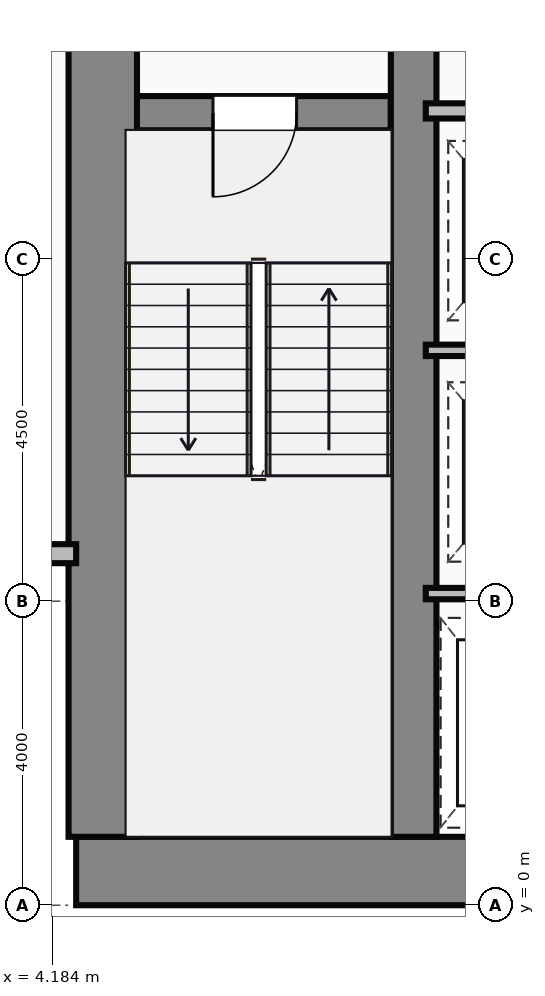
"""IFC4 building model, lengths in metres.
Left out: names, types, materials, properties, quantities, classifications, styles, units other than length and angle.
Written with IfcOpenShell. Run it as: python <this file> out.ifc"""

import sys

from ifc_helpers import new_model, si_unit, direction, frame, frame_2d, origin, place, context, subcontext, project, spatial, rectangle, extrude, source, transform, mapped, element, fill, save


model = new_model("IFC4")
c1 = context("Model", 3, precision=1e-05, world=origin(), true_north=direction((0.0, 1.0)))
c2 = subcontext(c1, "Body", "Model", "MODEL_VIEW")
j1 = project(units=[si_unit("LENGTHUNIT", "METRE"), si_unit("PLANEANGLEUNIT", "RADIAN")], contexts=[c1])
p1 = place(None, origin())
s1 = spatial("IfcSite", under=j1, at=p1, CompositionType="ELEMENT")
p2 = place(p1, origin())
s2 = spatial("IfcBuilding", under=s1, at=p2, CompositionType="ELEMENT")
p3 = place(p2, frame((0.0, 0.0, 72.65)))
s3 = spatial("IfcBuildingStorey", under=s2, at=p3, CompositionType="ELEMENT", Elevation=72.65)
m1 = source(origin(), c2, "Body", "SweptSolid", [
    extrude(rectangle(XDim=29.5, YDim=0.9, at=frame_2d((14.75, 0.0))), origin(), (0.0, 0.0, 1.0), 3.65),
])
p4 = place(p3, frame((4.5, 0.45, 0.0), z_axis=(0.0, 0.0, 1.0), x_axis=(1.0, 0.0, 0.0)))
e1 = element("IfcWall", 1, at=p4, inside=s3, PredefinedType="SHEAR", context=c2, shape_type="MappedRepresentation", body=[
    mapped(m1, transform((0.0, 0.0, 0.0))),
])
m2 = source(origin(), c2, "Body", "SweptSolid", [
    extrude(rectangle(XDim=13.1, YDim=0.9, at=frame_2d((6.55, 0.0))), origin(), (0.0, 0.0, 1.0), 3.65),
])
p5 = place(p3, frame((4.85, 0.9, 0.0), z_axis=(0.0, 0.0, 1.0), x_axis=(0.0, 1.0, 0.0)))
e2 = element("IfcWall", 2, at=p5, inside=s3, PredefinedType="SHEAR", context=c2, shape_type="MappedRepresentation", body=[
    mapped(m2, transform((0.0, 0.0, 0.0))),
])
m3 = source(origin(), c2, "Body", "SweptSolid", [
    extrude(rectangle(XDim=12.2, YDim=0.6, at=frame_2d((6.1, 0.0))), origin(), (0.0, 0.0, 1.0), 3.65),
])
p6 = place(p3, frame((8.94, 0.9, 0.0), z_axis=(0.0, 0.0, 1.0), x_axis=(0.0, 1.0, 0.0)))
e3 = element("IfcWall", 3, at=p6, inside=s3, PredefinedType="SHEAR", context=c2, shape_type="MappedRepresentation", body=[
    mapped(m3, transform((0.0, 0.0, 0.0))),
])
m4 = source(origin(), c2, "Body", "SweptSolid", [
    extrude(rectangle(XDim=3.39, YDim=0.45, at=frame_2d((1.695, 0.0))), origin(), (0.0, 0.0, 1.0), 3.65),
])
p7 = place(p3, frame((5.25, 10.42, 0.0), z_axis=(0.0, 0.0, 1.0), x_axis=(1.0, 0.0, 0.0)))
e4 = element("IfcWall", 4, at=p7, inside=s3, PredefinedType="SHEAR", context=c2, shape_type="MappedRepresentation", body=[
    mapped(m4, transform((0.0, 0.0, 0.0))),
])
p8 = place(p7, frame((1.05, 0.0, 0.0)))
e5 = element("IfcOpeningElement", 5, at=p8, cuts=e4, PredefinedType="OPENING", context=c2, shape_type="SweptSolid", body=[
    extrude(rectangle(XDim=1.1, YDim=2.15, at=frame_2d((0.55, 1.075))), frame((0.0, 0.235, 0.0), z_axis=(0.0, -1.0, 0.0), x_axis=(1.0, 0.0, 0.0)), (0.0, 0.0, 1.0), 0.47),
])
m5 = source(origin(), c2, "Body", "SweptSolid", [
    extrude(rectangle(XDim=4.5, YDim=0.25, at=frame_2d((2.25, 0.0))), origin(), (0.0, 0.0, 1.0), 3.4),
])
p9 = place(p3, frame((0.0, 4.625, 0.0), z_axis=(0.0, 0.0, 1.0), x_axis=(1.0, 0.0, 0.0)))
e6 = element("IfcWall", 6, at=p9, inside=s3, PredefinedType="STANDARD", context=c2, shape_type="MappedRepresentation", body=[
    mapped(m5, transform((0.0, 0.0, 0.0))),
])
m6 = source(origin(), c2, "Body", "SweptSolid", [
    extrude(rectangle(XDim=2.35, YDim=0.2, at=frame_2d((1.175, 0.0))), origin(), (0.0, 0.0, 1.0), 3.4),
])
p10 = place(p3, frame((9.1, 10.45, 0.0), z_axis=(0.0, 0.0, 1.0), x_axis=(1.0, 0.0, 0.0)))
e7 = element("IfcWall", 7, at=p10, inside=s3, PredefinedType="PARTITIONING", context=c2, shape_type="MappedRepresentation", body=[
    mapped(m6, transform((0.0, 0.0, 0.0))),
])
p11 = place(p10, frame((0.55, 0.0, 0.0)))
e8 = element("IfcOpeningElement", 8, at=p11, cuts=e7, PredefinedType="OPENING", context=c2, shape_type="SweptSolid", body=[
    extrude(rectangle(XDim=1.1, YDim=2.15, at=frame_2d((0.55, 1.075))), frame((0.0, 0.11, 0.0), z_axis=(0.0, -1.0, 0.0), x_axis=(1.0, 0.0, 0.0)), (0.0, 0.0, 1.0), 0.22),
])
m7 = source(origin(), c2, "Body", "SweptSolid", [
    extrude(rectangle(XDim=2.4, YDim=0.15, at=frame_2d((1.2, 0.0))), origin(), (0.0, 0.0, 1.0), 3.4),
])
for number, where, z_axis, x_axis in (
    (9, (9.1, 4.1, 0.0), (0.0, 0.0, 1.0), (1.0, 0.0, 0.0)),
    (10, (9.1, 7.3, 0.0), (0.0, 0.0, 1.0), (1.0, 0.0, 0.0)),
):
    element("IfcWall", number, at=place(p3, frame(where, z_axis=z_axis, x_axis=x_axis)), inside=s3, PredefinedType="PARTITIONING", context=c2, shape_type="MappedRepresentation", body=[
        mapped(m7, transform((0.0, 0.0, 0.0))),
    ])
m8 = source(origin(), c2, "Body", "SweptSolid", [
    extrude(rectangle(XDim=1.1, YDim=2.15, at=frame_2d((0.55, 1.075))), frame((0.0, 0.025, 0.0), z_axis=(0.0, -1.0, 0.0), x_axis=(1.0, 0.0, 0.0)), (0.0, 0.0, 1.0), 0.05),
])
p12 = place(p8, frame((1.1, 0.0, 0.0), z_axis=(0.0, 0.0, 1.0), x_axis=(-1.0, 0.0, 0.0)))
e11 = element("IfcDoor", 11, at=p12, inside=s3, OperationType="SINGLE_SWING_LEFT", PredefinedType="DOOR", context=c2, shape_type="MappedRepresentation", body=[
    mapped(m8, transform((0.0, 0.0, 0.0))),
])
fill(e5, e11)
save(model, sys.argv[1])
